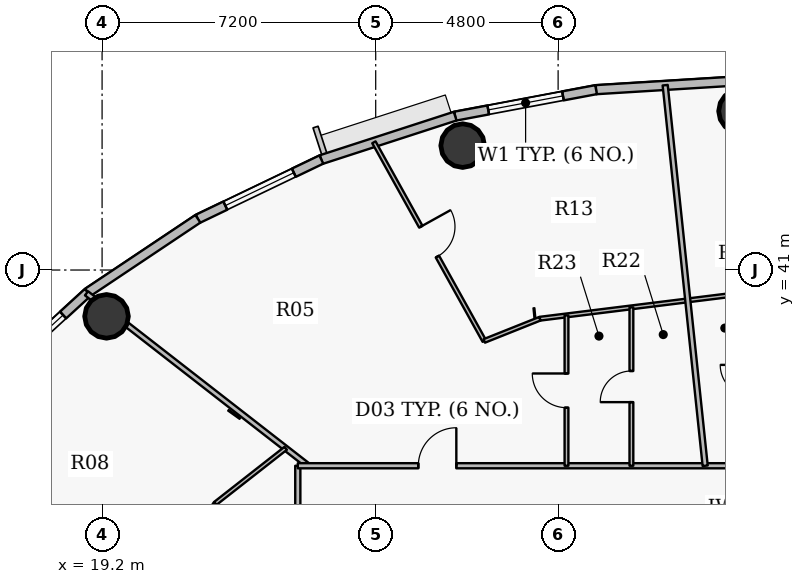
"""IFC4 building model, lengths in metres.
Left out: names, types, materials, properties, quantities, classifications, styles, units other than length and angle.
Written with IfcOpenShell. Run it as: python <this file> out.ifc"""

import sys

from ifc_helpers import new_model, si_unit, direction, frame, frame_2d, origin, origin_2d, place, context, subcontext, project, spatial, rectangle, hollow_circle, extrude, source, transform, mapped, element, fill, save


model = new_model("IFC4")
c1 = context("Model", 3, precision=1e-05, world=origin(), true_north=direction((0.0, 1.0)))
c2 = subcontext(c1, "Body", "Model", "MODEL_VIEW")
j1 = project(units=[si_unit("LENGTHUNIT", "METRE"), si_unit("PLANEANGLEUNIT", "RADIAN")], contexts=[c1])
p1 = place(None, origin())
s1 = spatial("IfcSite", under=j1, at=p1, CompositionType="ELEMENT")
p2 = place(p1, origin())
s2 = spatial("IfcBuilding", under=s1, at=p2, CompositionType="ELEMENT")
p3 = place(p2, frame((0.0, 0.0, 232.8)))
s3 = spatial("IfcBuildingStorey", under=s2, at=p3, CompositionType="ELEMENT", Elevation=232.8)
for number, where, z_axis, x_axis in (
    (1, (36.0, 45.18, 0.0), (0.0, 0.0, 1.0), (1.0, 0.0, 0.0)),
    (2, (28.688, 44.273, 0.0), (0.0, 0.0, 1.0), (1.0, 0.0, 0.0)),
    (3, (19.317, 39.781, 0.0), (0.0, 0.0, 1.0), (1.0, 0.0, 0.0)),
):
    element("IfcColumn", number, at=place(p3, frame(where, z_axis=z_axis, x_axis=x_axis)), inside=s3, PredefinedType="COLUMN", context=c2, shape_type="SweptSolid", body=[
        extrude(hollow_circle(Radius=0.575, WallThickness=0.036, at=origin_2d()), origin(), (0.0, 0.0, 1.0), 3.75),
    ])
p4 = place(p3, frame((32.198, 45.746, 0.0), z_axis=(0.0, 0.0, 1.0), x_axis=(0.998108785312, 0.06147237333, 0.0)))
e4 = element("IfcWall", 4, at=p4, inside=s3, PredefinedType="SOLIDWALL", context=c2, shape_type="SweptSolid", body=[
    extrude(rectangle(XDim=3.809, YDim=0.24, at=frame_2d((1.904, 0.0))), origin(), (0.0, 0.0, 1.0), 3.5),
])
p5 = place(p3, frame((28.491, 45.049, 0.0), z_axis=(0.0, 0.0, 1.0), x_axis=(0.982784898575, 0.184753465822, 0.0)))
e5 = element("IfcWall", 5, at=p5, inside=s3, PredefinedType="SOLIDWALL", context=c2, shape_type="SweptSolid", body=[
    extrude(rectangle(XDim=3.773, YDim=0.24, at=frame_2d((1.886, 0.0))), origin(), (0.0, 0.0, 1.0), 3.5),
])
p6 = place(p5, frame((0.886, 0.0, 0.9)))
e6 = element("IfcOpeningElement", 6, at=p6, cuts=e5, PredefinedType="OPENING", context=c2, shape_type="SweptSolid", body=[
    extrude(rectangle(XDim=2.0, YDim=1.75, at=origin_2d()), frame((1.0, 0.13, 0.875), z_axis=(0.0, -1.0, 0.0), x_axis=(1.0, 0.0, 0.0)), (0.0, 0.0, 1.0), 0.26),
])
p7 = place(p3, frame((24.969, 43.906, 0.0), z_axis=(0.0, 0.0, 1.0), x_axis=(0.951210789182, 0.308541787354, 0.0)))
e7 = element("IfcWall", 7, at=p7, inside=s3, PredefinedType="SOLIDWALL", context=c2, shape_type="SweptSolid", body=[
    extrude(rectangle(XDim=3.702, YDim=0.24, at=frame_2d((1.851, 0.0))), origin(), (0.0, 0.0, 1.0), 3.5),
])
p8 = place(p3, frame((21.72, 42.348, 0.0), z_axis=(0.0, 0.0, 1.0), x_axis=(0.901598104751, 0.432574684313, 0.0)))
e8 = element("IfcWall", 8, at=p8, inside=s3, PredefinedType="SOLIDWALL", context=c2, shape_type="SweptSolid", body=[
    extrude(rectangle(XDim=3.604, YDim=0.24, at=frame_2d((1.802, 0.0))), origin(), (0.0, 0.0, 1.0), 3.5),
])
p9 = place(p8, frame((0.802, 0.0, 0.9)))
e9 = element("IfcOpeningElement", 9, at=p9, cuts=e8, PredefinedType="OPENING", context=c2, shape_type="SweptSolid", body=[
    extrude(rectangle(XDim=2.0, YDim=1.75, at=origin_2d()), frame((1.0, 0.13, 0.875), z_axis=(0.0, -1.0, 0.0), x_axis=(1.0, 0.0, 0.0)), (0.0, 0.0, 1.0), 0.26),
])
p10 = place(p3, frame((18.824, 40.411, 0.0), z_axis=(0.0, 0.0, 1.0), x_axis=(0.831262496074, 0.555880079352, 0.0)))
e10 = element("IfcWall", 10, at=p10, inside=s3, PredefinedType="SOLIDWALL", context=c2, shape_type="SweptSolid", body=[
    extrude(rectangle(XDim=3.484, YDim=0.24, at=frame_2d((1.742, 0.0))), origin(), (0.0, 0.0, 1.0), 3.5),
])
p11 = place(p3, frame((16.352, 38.145, 0.0), z_axis=(0.0, 0.0, 1.0), x_axis=(0.737123922599, 0.675757591694, 0.0)))
e11 = element("IfcWall", 11, at=p11, inside=s3, PredefinedType="SOLIDWALL", context=c2, shape_type="SweptSolid", body=[
    extrude(rectangle(XDim=3.354, YDim=0.24, at=frame_2d((1.677, 0.0))), origin(), (0.0, 0.0, 1.0), 3.5),
])
p12 = place(p11, frame((0.873, 0.0, 0.9)))
e12 = element("IfcOpeningElement", 12, at=p12, cuts=e11, PredefinedType="OPENING", context=c2, shape_type="SweptSolid", body=[
    extrude(rectangle(XDim=1.6, YDim=1.75, at=origin_2d()), frame((0.8, 0.13, 0.875), z_axis=(0.0, -1.0, 0.0), x_axis=(1.0, 0.0, 0.0)), (0.0, 0.0, 1.0), 0.26),
])
p13 = place(p3, frame((18.791, 40.387, 0.0), z_axis=(0.0, 0.0, 1.0), x_axis=(0.789302404173, -0.614004653701, 0.0)))
e13 = element("IfcWall", 13, at=p13, inside=s3, PredefinedType="PARTITIONING", context=c2, shape_type="SweptSolid", body=[
    extrude(rectangle(XDim=7.39, YDim=0.135, at=frame_2d((3.695, 0.0))), origin(), (0.0, 0.0, 1.0), 2.935),
])
p14 = place(p3, frame((19.847, 31.273, 0.0), z_axis=(0.0, 0.0, 1.0), x_axis=(0.545399280946, 0.83817636828, 0.0)))
e14 = element("IfcWall", 14, at=p14, inside=s3, PredefinedType="PARTITIONING", context=c2, shape_type="SweptSolid", body=[
    extrude(rectangle(XDim=4.28, YDim=0.1, at=frame_2d((2.14, 0.0))), origin(), (0.0, 0.0, 1.0), 2.935),
])
p15 = place(p3, frame((22.182, 34.861, 0.0), z_axis=(0.0, 0.0, 1.0), x_axis=(0.78737344739, 0.616476320994, 0.0)))
e15 = element("IfcWall", 15, at=p15, inside=s3, PredefinedType="PARTITIONING", context=c2, shape_type="SweptSolid", body=[
    extrude(rectangle(XDim=2.35, YDim=0.1, at=frame_2d((1.175, 0.0))), origin(), (0.0, 0.0, 1.0), 2.935),
])
p16 = place(p3, frame((24.35, 27.95, 0.0), z_axis=(0.0, 0.0, 1.0), x_axis=(0.0, 1.0, 0.0)))
e16 = element("IfcWall", 16, at=p16, inside=s3, PredefinedType="PARTITIONING", context=c2, shape_type="SweptSolid", body=[
    extrude(rectangle(XDim=7.9, YDim=0.135, at=frame_2d((3.95, 0.0))), origin(), (0.0, 0.0, 1.0), 2.935),
])
p17 = place(p16, frame((3.45, 0.0, 0.0)))
e17 = element("IfcOpeningElement", 17, at=p17, cuts=e16, PredefinedType="OPENING", context=c2, shape_type="SweptSolid", body=[
    extrude(rectangle(XDim=1.0, YDim=2.15, at=origin_2d()), frame((0.5, 0.078, 1.075), z_axis=(0.0, -1.0, 0.0), x_axis=(1.0, 0.0, 0.0)), (0.0, 0.0, 1.0), 0.155),
])
p18 = place(p3, frame((24.35, 35.85, 0.0), z_axis=(0.0, 0.0, 1.0), x_axis=(1.0, 0.0, 0.0)))
e18 = element("IfcWall", 18, at=p18, inside=s3, PredefinedType="PARTITIONING", context=c2, shape_type="SweptSolid", body=[
    extrude(rectangle(XDim=26.218, YDim=0.135, at=frame_2d((13.109, 0.0))), origin(), (0.0, 0.0, 1.0), 2.935),
])
p19 = place(p18, frame((3.172, 0.0, 0.0)))
e19 = element("IfcOpeningElement", 19, at=p19, cuts=e18, PredefinedType="OPENING", context=c2, shape_type="SweptSolid", body=[
    extrude(rectangle(XDim=1.0, YDim=2.15, at=origin_2d()), frame((0.5, 0.078, 1.075), z_axis=(0.0, -1.0, 0.0), x_axis=(1.0, 0.0, 0.0)), (0.0, 0.0, 1.0), 0.155),
])
p20 = place(p18, frame((18.306, 0.0, 0.0)))
e20 = element("IfcOpeningElement", 20, at=p20, cuts=e18, PredefinedType="OPENING", context=c2, shape_type="SweptSolid", body=[
    extrude(rectangle(XDim=1.0, YDim=2.15, at=origin_2d()), frame((0.5, 0.078, 1.075), z_axis=(0.0, -1.0, 0.0), x_axis=(1.0, 0.0, 0.0)), (0.0, 0.0, 1.0), 0.155),
])
p21 = place(p3, frame((26.353, 44.361, 0.0), z_axis=(0.0, 0.0, 1.0), x_axis=(0.485760805935, -0.874091779745, 0.0)))
e21 = element("IfcWall", 21, at=p21, inside=s3, PredefinedType="PARTITIONING", context=c2, shape_type="SweptSolid", body=[
    extrude(rectangle(XDim=5.979, YDim=0.1, at=frame_2d((2.989, 0.0))), origin(), (0.0, 0.0, 1.0), 2.985),
])
p22 = place(p21, frame((2.539, 0.0, 0.0)))
e22 = element("IfcOpeningElement", 22, at=p22, cuts=e21, PredefinedType="OPENING", context=c2, shape_type="SweptSolid", body=[
    extrude(rectangle(XDim=0.9, YDim=2.1, at=origin_2d()), frame((0.45, 0.06, 1.05), z_axis=(0.0, -1.0, 0.0), x_axis=(1.0, 0.0, 0.0)), (0.0, 0.0, 1.0), 0.12),
])
p23 = place(p3, frame((29.257, 39.135, 0.0), z_axis=(0.0, 0.0, 1.0), x_axis=(0.928796620339, 0.370589851515, 0.0)))
e23 = element("IfcWall", 23, at=p23, inside=s3, PredefinedType="PARTITIONING", context=c2, shape_type="SweptSolid", body=[
    extrude(rectangle(XDim=1.577, YDim=0.1, at=frame_2d((0.789, 0.0))), origin(), (0.0, 0.0, 1.0), 2.935),
])
p24 = place(p3, frame((30.722, 39.719, 0.0), z_axis=(0.0, 0.0, 1.0), x_axis=(0.992397473883, 0.123074180196, 0.0)))
e24 = element("IfcWall", 24, at=p24, inside=s3, PredefinedType="PARTITIONING", context=c2, shape_type="SweptSolid", body=[
    extrude(rectangle(XDim=5.318, YDim=0.1, at=frame_2d((2.659, 0.0))), origin(), (0.0, 0.0, 1.0), 2.935),
])
p25 = place(p3, frame((31.42, 35.85, 0.0), z_axis=(0.0, 0.0, 1.0), x_axis=(0.0, 1.0, 0.0)))
e25 = element("IfcWall", 25, at=p25, inside=s3, PredefinedType="PARTITIONING", context=c2, shape_type="SweptSolid", body=[
    extrude(rectangle(XDim=3.956, YDim=0.1, at=frame_2d((1.978, 0.0))), origin(), (0.0, 0.0, 1.0), 2.935),
])
p26 = place(p25, frame((1.528, 0.0, 0.0)))
e26 = element("IfcOpeningElement", 26, at=p26, cuts=e25, PredefinedType="OPENING", context=c2, shape_type="SweptSolid", body=[
    extrude(rectangle(XDim=0.9, YDim=2.1, at=origin_2d()), frame((0.45, 0.06, 1.05), z_axis=(0.0, -1.0, 0.0), x_axis=(1.0, 0.0, 0.0)), (0.0, 0.0, 1.0), 0.12),
])
p27 = place(p3, frame((33.129, 35.85, 0.0), z_axis=(0.0, 0.0, 1.0), x_axis=(0.0, 1.0, 0.0)))
e27 = element("IfcWall", 27, at=p27, inside=s3, PredefinedType="PARTITIONING", context=c2, shape_type="SweptSolid", body=[
    extrude(rectangle(XDim=4.167, YDim=0.1, at=frame_2d((2.083, 0.0))), origin(), (0.0, 0.0, 1.0), 3.185),
])
p28 = place(p27, frame((1.674, 0.0, 0.0)))
e28 = element("IfcOpeningElement", 28, at=p28, cuts=e27, PredefinedType="OPENING", context=c2, shape_type="SweptSolid", body=[
    extrude(rectangle(XDim=0.82, YDim=2.1, at=origin_2d()), frame((0.41, 0.06, 1.05), z_axis=(0.0, -1.0, 0.0), x_axis=(1.0, 0.0, 0.0)), (0.0, 0.0, 1.0), 0.12),
])
p29 = place(p3, frame((34.017, 45.863, 0.0), z_axis=(0.0, 0.0, 1.0), x_axis=(0.104537097471, -0.994520987839, 0.0)))
e29 = element("IfcWall", 29, at=p29, inside=s3, PredefinedType="PARTITIONING", context=c2, shape_type="SweptSolid", body=[
    extrude(rectangle(XDim=10.068, YDim=0.135, at=frame_2d((5.034, 0.0))), origin(), (0.0, 0.0, 1.0), 2.985),
])
m1 = source(origin(), c2, "Body", "SweptSolid", [
    extrude(rectangle(XDim=2.0, YDim=1.75, at=origin_2d()), frame((1.0, 0.03, 0.875), z_axis=(0.0, -1.0, 0.0), x_axis=(1.0, 0.0, 0.0)), (0.0, 0.0, 1.0), 0.06),
])
p30 = place(p6, origin())
e30 = element("IfcWindow", 30, at=p30, inside=s3, PartitioningType="DOUBLE_PANEL_VERTICAL", PredefinedType="WINDOW", context=c2, shape_type="MappedRepresentation", body=[
    mapped(m1, transform((0.0, 0.0, 0.0), x_axis=(1.0, 0.0, 0.0), y_axis=(0.0, 1.0, 0.0), z_axis=(0.0, 0.0, 1.0), scale=1.0)),
])
fill(e6, e30)
p31 = place(p9, origin())
e31 = element("IfcWindow", 31, at=p31, inside=s3, PartitioningType="DOUBLE_PANEL_VERTICAL", PredefinedType="WINDOW", context=c2, shape_type="MappedRepresentation", body=[
    mapped(m1, transform((0.0, 0.0, 0.0), x_axis=(1.0, 0.0, 0.0), y_axis=(0.0, 1.0, 0.0), z_axis=(0.0, 0.0, 1.0), scale=1.0)),
])
fill(e9, e31)
m2 = source(origin(), c2, "Body", "SweptSolid", [
    extrude(rectangle(XDim=1.6, YDim=1.75, at=origin_2d()), frame((0.8, 0.03, 0.875), z_axis=(0.0, -1.0, 0.0), x_axis=(1.0, 0.0, 0.0)), (0.0, 0.0, 1.0), 0.06),
])
p32 = place(p12, origin())
e32 = element("IfcWindow", 32, at=p32, inside=s3, PartitioningType="DOUBLE_PANEL_VERTICAL", PredefinedType="WINDOW", context=c2, shape_type="MappedRepresentation", body=[
    mapped(m2, transform((0.0, 0.0, 0.0), x_axis=(1.0, 0.0, 0.0), y_axis=(0.0, 1.0, 0.0), z_axis=(0.0, 0.0, 1.0), scale=1.0)),
])
fill(e12, e32)
m3 = source(origin(), c2, "Body", "SweptSolid", [
    extrude(rectangle(XDim=1.0, YDim=2.15, at=origin_2d()), frame((0.5, 0.025, 1.075), z_axis=(0.0, -1.0, 0.0), x_axis=(1.0, 0.0, 0.0)), (0.0, 0.0, 1.0), 0.05),
])
p33 = place(p19, origin())
e33 = element("IfcDoor", 33, at=p33, inside=s3, OperationType="SINGLE_SWING_RIGHT", PredefinedType="DOOR", context=c2, shape_type="MappedRepresentation", body=[
    mapped(m3, transform((0.0, 0.0, 0.0), x_axis=(1.0, 0.0, 0.0), y_axis=(0.0, 1.0, 0.0), z_axis=(0.0, 0.0, 1.0), scale=1.0)),
])
fill(e19, e33)
m4 = source(origin(), c2, "Body", "SweptSolid", [
    extrude(rectangle(XDim=0.9, YDim=2.1, at=origin_2d()), frame((0.45, 0.025, 1.05), z_axis=(0.0, -1.0, 0.0), x_axis=(1.0, 0.0, 0.0)), (0.0, 0.0, 1.0), 0.05),
])
p34 = place(p22, origin())
e34 = element("IfcDoor", 34, at=p34, inside=s3, OperationType="SINGLE_SWING_LEFT", PredefinedType="DOOR", context=c2, shape_type="MappedRepresentation", body=[
    mapped(m4, transform((0.0, 0.0, 0.0), x_axis=(1.0, 0.0, 0.0), y_axis=(0.0, 1.0, 0.0), z_axis=(0.0, 0.0, 1.0), scale=1.0)),
])
fill(e22, e34)
p35 = place(p26, origin())
e35 = element("IfcDoor", 35, at=p35, inside=s3, OperationType="SINGLE_SWING_RIGHT", PredefinedType="DOOR", context=c2, shape_type="MappedRepresentation", body=[
    mapped(m4, transform((0.0, 0.0, 0.0), x_axis=(1.0, 0.0, 0.0), y_axis=(0.0, 1.0, 0.0), z_axis=(0.0, 0.0, 1.0), scale=1.0)),
])
fill(e26, e35)
m5 = source(origin(), c2, "Body", "SweptSolid", [
    extrude(rectangle(XDim=0.82, YDim=2.1, at=origin_2d()), frame((0.41, 0.025, 1.05), z_axis=(0.0, -1.0, 0.0), x_axis=(1.0, 0.0, 0.0)), (0.0, 0.0, 1.0), 0.05),
])
p36 = place(p28, origin())
e36 = element("IfcDoor", 36, at=p36, inside=s3, OperationType="SINGLE_SWING_LEFT", PredefinedType="DOOR", context=c2, shape_type="MappedRepresentation", body=[
    mapped(m5, transform((0.0, 0.0, 0.0), x_axis=(1.0, 0.0, 0.0), y_axis=(0.0, 1.0, 0.0), z_axis=(0.0, 0.0, 1.0), scale=1.0)),
])
fill(e28, e36)
save(model, sys.argv[1])
